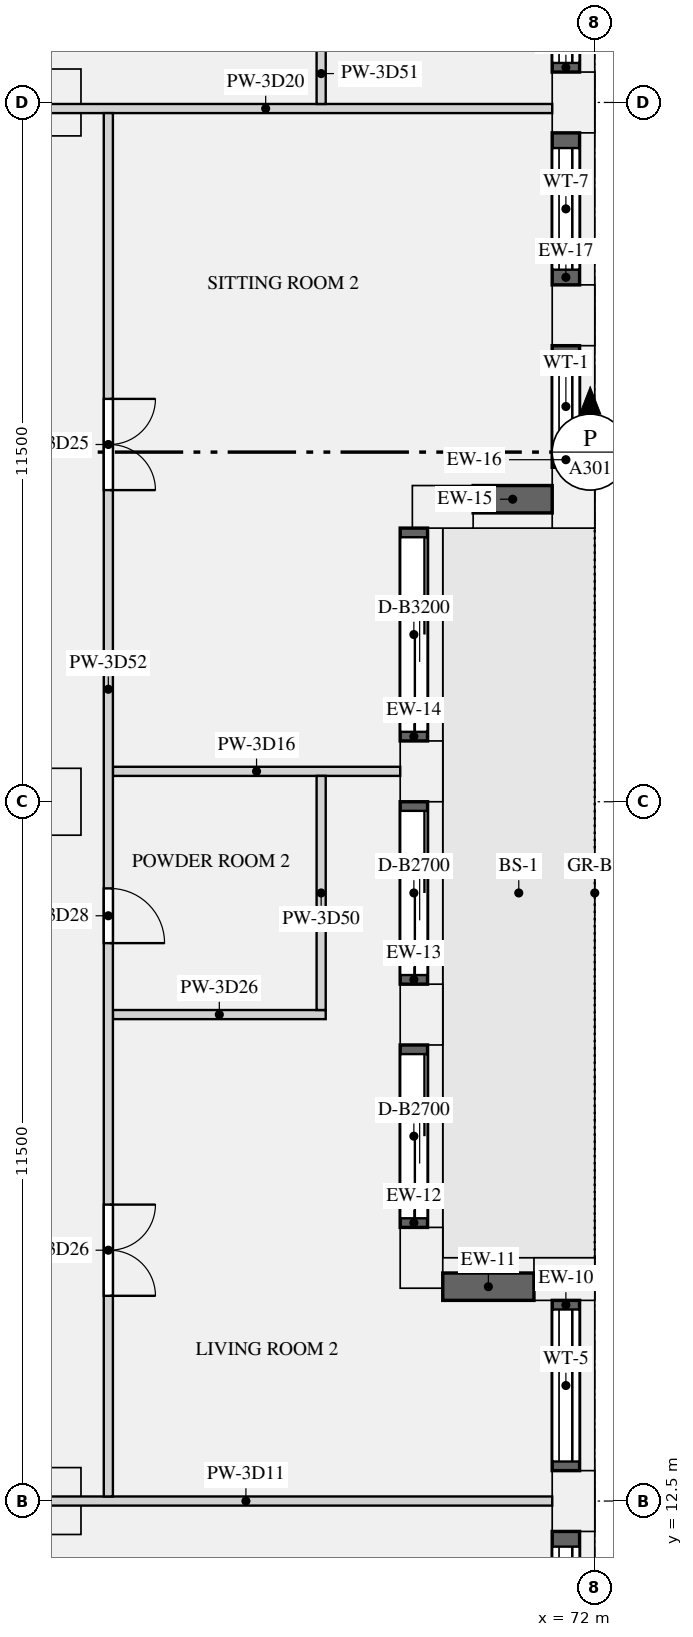
"""IFC4 building model, lengths in metres.
Left out: names, types, materials, properties, quantities, classifications, styles, units other than length and angle.
Written with IfcOpenShell. Run it as: python <this file> out.ifc"""

import sys

from ifc_helpers import new_model, si_unit, direction, frame, frame_2d, origin, origin_2d, place, context, subcontext, project, spatial, rectangle, extrude, element, fill, save


model = new_model("IFC4")
c1 = context("Model", 3, precision=1e-05, world=origin(), true_north=direction((0.0, 1.0)))
c2 = subcontext(c1, "Body", "Model", "MODEL_VIEW")
j1 = project(units=[si_unit("LENGTHUNIT", "METRE"), si_unit("PLANEANGLEUNIT", "RADIAN")], contexts=[c1])
p1 = place(None, origin())
s1 = spatial("IfcSite", under=j1, at=p1, CompositionType="ELEMENT")
p2 = place(p1, origin())
s2 = spatial("IfcBuilding", under=s1, at=p2, CompositionType="ELEMENT")
p3 = place(p2, frame((0.0, 0.0, 166.5)))
s3 = spatial("IfcBuildingStorey", under=s2, at=p3, CompositionType="ELEMENT", Elevation=166.5)
for number, where, z_axis, x_axis in (
    (1, (71.65, 12.5, 0.0), (0.0, 0.0, 1.0), (0.0, 1.0, 0.0)),
    (2, (71.5, 16.15, 0.0), (0.0, 0.0, 1.0), (-1.0, 0.0, 0.0)),
    (3, (69.15, 16.5, 0.0), (0.0, 0.0, 1.0), (0.0, 1.0, 0.0)),
    (4, (69.15, 20.5, 0.0), (0.0, 0.0, 1.0), (0.0, 1.0, 0.0)),
    (5, (69.15, 24.5, 0.0), (0.0, 0.0, 1.0), (0.0, 1.0, 0.0)),
    (6, (69.5, 28.85, 0.0), (0.0, 0.0, 1.0), (1.0, 0.0, 0.0)),
    (7, (71.65, 29.0, 0.0), (0.0, 0.0, 1.0), (0.0, 1.0, 0.0)),
    (8, (71.65, 32.0, 0.0), (0.0, 0.0, 1.0), (0.0, 1.0, 0.0)),
    (9, (71.65, 35.5, 0.0), (0.0, 0.0, 1.0), (0.0, 1.0, 0.0)),
):
    element("IfcColumn", number, at=place(p3, frame(where, z_axis=z_axis, x_axis=x_axis)), inside=s3, PredefinedType="USERDEFINED", context=c2, shape_type="SweptSolid", body=[
        extrude(rectangle(XDim=1.0, YDim=0.7, at=origin_2d()), origin(), (0.0, 0.0, 1.0), 3.15),
    ])
for number, where, z_axis, x_axis in (
    (10, (63.0, 24.0, 0.0), (0.0, 0.0, 1.0), (1.0, 0.0, 0.0)),
    (11, (63.0, 35.5, 0.0), (0.0, 0.0, 1.0), (1.0, 0.0, 0.0)),
    (12, (63.0, 12.5, 0.0), (0.0, 0.0, 1.0), (1.0, 0.0, 0.0)),
):
    element("IfcColumn", number, at=place(p3, frame(where, z_axis=z_axis, x_axis=x_axis)), inside=s3, PredefinedType="COLUMN", context=c2, shape_type="SweptSolid", body=[
        extrude(rectangle(XDim=1.1, YDim=1.1, at=origin_2d()), origin(), (0.0, 0.0, 1.0), 3.15),
    ])
p4 = place(p3, frame((71.525, 9.0, 0.9), z_axis=(0.0, 0.0, 1.0), x_axis=(0.0, 1.0, 0.0)))
e13 = element("IfcWall", 13, at=p4, inside=s3, PredefinedType="SOLIDWALL", context=c2, shape_type="SweptSolid", body=[
    extrude(rectangle(XDim=3.0, YDim=0.45, at=frame_2d((1.5, 0.0))), origin(), (0.0, 0.0, 1.0), 1.93),
])
p5 = place(p4, frame((0.25, 0.0, 0.15)))
e14 = element("IfcOpeningElement", 14, at=p5, cuts=e13, PredefinedType="OPENING", context=c2, shape_type="SweptSolid", body=[
    extrude(rectangle(XDim=2.5, YDim=1.5, at=frame_2d((1.25, 0.75))), frame((0.0, 0.235, 0.0), z_axis=(0.0, -1.0, 0.0), x_axis=(1.0, 0.0, 0.0)), (0.0, 0.0, 1.0), 0.47),
])
p6 = place(p3, frame((71.525, 13.0, 0.9), z_axis=(0.0, 0.0, 1.0), x_axis=(0.0, 1.0, 0.0)))
e15 = element("IfcWall", 15, at=p6, inside=s3, PredefinedType="SOLIDWALL", context=c2, shape_type="SweptSolid", body=[
    extrude(rectangle(XDim=2.8, YDim=0.45, at=frame_2d((1.4, 0.0))), origin(), (0.0, 0.0, 1.0), 1.93),
])
p7 = place(p6, frame((0.15, 0.0, 0.15)))
e16 = element("IfcOpeningElement", 16, at=p7, cuts=e15, PredefinedType="OPENING", context=c2, shape_type="SweptSolid", body=[
    extrude(rectangle(XDim=2.5, YDim=1.5, at=frame_2d((1.25, 0.75))), frame((0.0, 0.235, 0.0), z_axis=(0.0, -1.0, 0.0), x_axis=(1.0, 0.0, 0.0)), (0.0, 0.0, 1.0), 0.47),
])
p8 = place(p3, frame((71.0, 16.025, 0.9), z_axis=(0.0, 0.0, 1.0), x_axis=(-1.0, 0.0, 0.0)))
e17 = element("IfcWall", 17, at=p8, inside=s3, PredefinedType="SOLIDWALL", context=c2, shape_type="SweptSolid", body=[
    extrude(rectangle(XDim=1.5, YDim=0.45, at=frame_2d((0.75, 0.0))), origin(), (0.0, 0.0, 1.0), 1.93),
])
p9 = place(p3, frame((69.025, 17.0, 0.0), z_axis=(0.0, 0.0, 1.0), x_axis=(0.0, 1.0, 0.0)))
e18 = element("IfcWall", 18, at=p9, inside=s3, PredefinedType="SOLIDWALL", context=c2, shape_type="SweptSolid", body=[
    extrude(rectangle(XDim=3.0, YDim=0.45, at=frame_2d((1.5, 0.0))), origin(), (0.0, 0.0, 1.0), 2.83),
])
p10 = place(p9, frame((0.15, 0.0, 0.0)))
e19 = element("IfcOpeningElement", 19, at=p10, cuts=e18, PredefinedType="OPENING", context=c2, shape_type="SweptSolid", body=[
    extrude(rectangle(XDim=2.7, YDim=2.3, at=frame_2d((1.35, 1.15))), frame((0.0, 0.235, 0.0), z_axis=(0.0, -1.0, 0.0), x_axis=(1.0, 0.0, 0.0)), (0.0, 0.0, 1.0), 0.47),
])
p11 = place(p3, frame((69.025, 21.0, 0.0), z_axis=(0.0, 0.0, 1.0), x_axis=(0.0, 1.0, 0.0)))
e20 = element("IfcWall", 20, at=p11, inside=s3, PredefinedType="SOLIDWALL", context=c2, shape_type="SweptSolid", body=[
    extrude(rectangle(XDim=3.0, YDim=0.45, at=frame_2d((1.5, 0.0))), origin(), (0.0, 0.0, 1.0), 2.83),
])
p12 = place(p11, frame((0.15, 0.0, 0.0)))
e21 = element("IfcOpeningElement", 21, at=p12, cuts=e20, PredefinedType="OPENING", context=c2, shape_type="SweptSolid", body=[
    extrude(rectangle(XDim=2.7, YDim=2.3, at=frame_2d((1.35, 1.15))), frame((0.0, 0.235, 0.0), z_axis=(0.0, -1.0, 0.0), x_axis=(1.0, 0.0, 0.0)), (0.0, 0.0, 1.0), 0.47),
])
p13 = place(p3, frame((69.025, 25.0, 0.0), z_axis=(0.0, 0.0, 1.0), x_axis=(0.0, 1.0, 0.0)))
e22 = element("IfcWall", 22, at=p13, inside=s3, PredefinedType="SOLIDWALL", context=c2, shape_type="SweptSolid", body=[
    extrude(rectangle(XDim=3.5, YDim=0.45, at=frame_2d((1.75, 0.0))), origin(), (0.0, 0.0, 1.0), 2.83),
])
p14 = place(p13, frame((0.15, 0.0, 0.0)))
e23 = element("IfcOpeningElement", 23, at=p14, cuts=e22, PredefinedType="OPENING", context=c2, shape_type="SweptSolid", body=[
    extrude(rectangle(XDim=3.2, YDim=2.3, at=frame_2d((1.6, 1.15))), frame((0.0, 0.235, 0.0), z_axis=(0.0, -1.0, 0.0), x_axis=(1.0, 0.0, 0.0)), (0.0, 0.0, 1.0), 0.47),
])
p15 = place(p3, frame((70.0, 28.975, 0.9), z_axis=(0.0, 0.0, 1.0), x_axis=(1.0, 0.0, 0.0)))
e24 = element("IfcWall", 24, at=p15, inside=s3, PredefinedType="SOLIDWALL", context=c2, shape_type="SweptSolid", body=[
    extrude(rectangle(XDim=1.3, YDim=0.45, at=frame_2d((0.65, 0.0))), origin(), (0.0, 0.0, 1.0), 1.93),
])
p16 = place(p3, frame((71.525, 29.5, 0.9), z_axis=(0.0, 0.0, 1.0), x_axis=(0.0, 1.0, 0.0)))
e25 = element("IfcWall", 25, at=p16, inside=s3, PredefinedType="SOLIDWALL", context=c2, shape_type="SweptSolid", body=[
    extrude(rectangle(XDim=2.0, YDim=0.45, at=frame_2d((1.0, 0.0))), origin(), (0.0, 0.0, 1.0), 1.93),
])
p17 = place(p16, frame((0.25, 0.0, 0.15)))
e26 = element("IfcOpeningElement", 26, at=p17, cuts=e25, PredefinedType="OPENING", context=c2, shape_type="SweptSolid", body=[
    extrude(rectangle(XDim=1.5, YDim=1.5, at=frame_2d((0.75, 0.75))), frame((0.0, 0.235, 0.0), z_axis=(0.0, -1.0, 0.0), x_axis=(1.0, 0.0, 0.0)), (0.0, 0.0, 1.0), 0.47),
])
p18 = place(p3, frame((71.525, 32.5, 0.9), z_axis=(0.0, 0.0, 1.0), x_axis=(0.0, 1.0, 0.0)))
e27 = element("IfcWall", 27, at=p18, inside=s3, PredefinedType="SOLIDWALL", context=c2, shape_type="SweptSolid", body=[
    extrude(rectangle(XDim=2.5, YDim=0.45, at=frame_2d((1.25, 0.0))), origin(), (0.0, 0.0, 1.0), 1.93),
])
p19 = place(p18, frame((0.25, 0.0, 0.15)))
e28 = element("IfcOpeningElement", 28, at=p19, cuts=e27, PredefinedType="OPENING", context=c2, shape_type="SweptSolid", body=[
    extrude(rectangle(XDim=2.0, YDim=1.5, at=frame_2d((1.0, 0.75))), frame((0.0, 0.235, 0.0), z_axis=(0.0, -1.0, 0.0), x_axis=(1.0, 0.0, 0.0)), (0.0, 0.0, 1.0), 0.47),
])
p20 = place(p3, frame((71.525, 36.0, 0.9), z_axis=(0.0, 0.0, 1.0), x_axis=(0.0, 1.0, 0.0)))
e29 = element("IfcWall", 29, at=p20, inside=s3, PredefinedType="SOLIDWALL", context=c2, shape_type="SweptSolid", body=[
    extrude(rectangle(XDim=2.3, YDim=0.45, at=frame_2d((1.15, 0.0))), origin(), (0.0, 0.0, 1.0), 1.93),
])
p21 = place(p20, frame((0.15, 0.0, 0.15)))
e30 = element("IfcOpeningElement", 30, at=p21, cuts=e29, PredefinedType="OPENING", context=c2, shape_type="SweptSolid", body=[
    extrude(rectangle(XDim=2.0, YDim=1.5, at=frame_2d((1.0, 0.75))), frame((0.0, 0.235, 0.0), z_axis=(0.0, -1.0, 0.0), x_axis=(1.0, 0.0, 0.0)), (0.0, 0.0, 1.0), 0.47),
])
p22 = place(p3, frame((54.0, 12.5, 0.0), z_axis=(0.0, 0.0, 1.0), x_axis=(1.0, 0.0, 0.0)))
e31 = element("IfcWall", 31, at=p22, inside=s3, PredefinedType="PARTITIONING", context=c2, shape_type="SweptSolid", body=[
    extrude(rectangle(XDim=17.3, YDim=0.15, at=frame_2d((8.65, 0.0))), origin(), (0.0, 0.0, 1.0), 2.83),
])
p23 = place(p22, frame((5.725, 0.0, 0.0)))
e32 = element("IfcOpeningElement", 32, at=p23, cuts=e31, PredefinedType="OPENING", context=c2, shape_type="SweptSolid", body=[
    extrude(rectangle(XDim=1.5, YDim=2.1, at=frame_2d((0.75, 1.05))), frame((0.0, 0.085, 0.0), z_axis=(0.0, -1.0, 0.0), x_axis=(1.0, 0.0, 0.0)), (0.0, 0.0, 1.0), 0.17),
])
p24 = place(p3, frame((64.075, 24.5, 0.0), z_axis=(0.0, 0.0, 1.0), x_axis=(1.0, 0.0, 0.0)))
e33 = element("IfcWall", 33, at=p24, inside=s3, PredefinedType="PARTITIONING", context=c2, shape_type="SweptSolid", body=[
    extrude(rectangle(XDim=4.725, YDim=0.15, at=frame_2d((2.363, 0.0))), origin(), (0.0, 0.0, 1.0), 2.83),
])
p25 = place(p3, frame((59.8, 35.4, 0.0), z_axis=(0.0, 0.0, 1.0), x_axis=(1.0, 0.0, 0.0)))
e34 = element("IfcWall", 34, at=p25, inside=s3, PredefinedType="PARTITIONING", context=c2, shape_type="SweptSolid", body=[
    extrude(rectangle(XDim=11.5, YDim=0.15, at=frame_2d((5.75, 0.0))), origin(), (0.0, 0.0, 1.0), 2.83),
])
p26 = place(p25, frame((0.575, 0.0, 0.0)))
e35 = element("IfcOpeningElement", 35, at=p26, cuts=e34, PredefinedType="OPENING", context=c2, shape_type="SweptSolid", body=[
    extrude(rectangle(XDim=1.5, YDim=2.1, at=frame_2d((0.75, 1.05))), frame((0.0, 0.085, 0.0), z_axis=(0.0, -1.0, 0.0), x_axis=(1.0, 0.0, 0.0)), (0.0, 0.0, 1.0), 0.17),
])
p27 = place(p3, frame((64.075, 20.5, 0.0), z_axis=(0.0, 0.0, 1.0), x_axis=(1.0, 0.0, 0.0)))
e36 = element("IfcWall", 36, at=p27, inside=s3, PredefinedType="PARTITIONING", context=c2, shape_type="SweptSolid", body=[
    extrude(rectangle(XDim=3.5, YDim=0.15, at=frame_2d((1.75, 0.0))), origin(), (0.0, 0.0, 1.0), 2.83),
])
p28 = place(p3, frame((67.5, 20.575, 0.0), z_axis=(0.0, 0.0, 1.0), x_axis=(0.0, 1.0, 0.0)))
e37 = element("IfcWall", 37, at=p28, inside=s3, PredefinedType="PARTITIONING", context=c2, shape_type="SweptSolid", body=[
    extrude(rectangle(XDim=3.85, YDim=0.15, at=frame_2d((1.925, 0.0))), origin(), (0.0, 0.0, 1.0), 2.83),
])
p29 = place(p3, frame((67.5, 35.475, 0.0), z_axis=(0.0, 0.0, 1.0), x_axis=(0.0, 1.0, 0.0)))
e38 = element("IfcWall", 38, at=p29, inside=s3, PredefinedType="PARTITIONING", context=c2, shape_type="SweptSolid", body=[
    extrude(rectangle(XDim=2.825, YDim=0.15, at=frame_2d((1.413, 0.0))), origin(), (0.0, 0.0, 1.0), 2.83),
])
p30 = place(p29, frame((1.0, 0.0, 0.0)))
e39 = element("IfcOpeningElement", 39, at=p30, cuts=e38, PredefinedType="OPENING", context=c2, shape_type="SweptSolid", body=[
    extrude(rectangle(XDim=0.9, YDim=2.1, at=frame_2d((0.45, 1.05))), frame((0.0, 0.085, 0.0), z_axis=(0.0, -1.0, 0.0), x_axis=(1.0, 0.0, 0.0)), (0.0, 0.0, 1.0), 0.17),
])
p31 = place(p3, frame((64.0, 12.575, 0.0), z_axis=(0.0, 0.0, 1.0), x_axis=(0.0, 1.0, 0.0)))
e40 = element("IfcWall", 40, at=p31, inside=s3, PredefinedType="PARTITIONING", context=c2, shape_type="SweptSolid", body=[
    extrude(rectangle(XDim=22.75, YDim=0.15, at=frame_2d((11.375, 0.0))), origin(), (0.0, 0.0, 1.0), 2.83),
])
p32 = place(p31, frame((16.55, 0.0, 0.0)))
e41 = element("IfcOpeningElement", 41, at=p32, cuts=e40, PredefinedType="OPENING", context=c2, shape_type="SweptSolid", body=[
    extrude(rectangle(XDim=1.5, YDim=2.1, at=frame_2d((0.75, 1.05))), frame((0.0, 0.085, 0.0), z_axis=(0.0, -1.0, 0.0), x_axis=(1.0, 0.0, 0.0)), (0.0, 0.0, 1.0), 0.17),
])
p33 = place(p31, frame((3.3, 0.0, 0.0)))
e42 = element("IfcOpeningElement", 42, at=p33, cuts=e40, PredefinedType="OPENING", context=c2, shape_type="SweptSolid", body=[
    extrude(rectangle(XDim=1.5, YDim=2.1, at=frame_2d((0.75, 1.05))), frame((0.0, 0.085, 0.0), z_axis=(0.0, -1.0, 0.0), x_axis=(1.0, 0.0, 0.0)), (0.0, 0.0, 1.0), 0.17),
])
p34 = place(p31, frame((9.1, 0.0, 0.0)))
e43 = element("IfcOpeningElement", 43, at=p34, cuts=e40, PredefinedType="OPENING", context=c2, shape_type="SweptSolid", body=[
    extrude(rectangle(XDim=0.9, YDim=2.1, at=frame_2d((0.45, 1.05))), frame((0.0, 0.085, 0.0), z_axis=(0.0, -1.0, 0.0), x_axis=(1.0, 0.0, 0.0)), (0.0, 0.0, 1.0), 0.17),
])
p35 = place(p5, origin())
e44 = element("IfcWindow", 44, at=p35, inside=s3, PartitioningType="SINGLE_PANEL", PredefinedType="WINDOW", context=c2, shape_type="SweptSolid", body=[
    extrude(rectangle(XDim=2.5, YDim=1.5, at=frame_2d((1.25, 0.75))), frame((0.0, -0.065, 0.0), z_axis=(0.0, -1.0, 0.0), x_axis=(1.0, 0.0, 0.0)), (0.0, 0.0, 1.0), 0.06),
])
fill(e14, e44)
p36 = place(p7, origin())
e45 = element("IfcWindow", 45, at=p36, inside=s3, PartitioningType="SINGLE_PANEL", PredefinedType="WINDOW", context=c2, shape_type="SweptSolid", body=[
    extrude(rectangle(XDim=2.5, YDim=1.5, at=frame_2d((1.25, 0.75))), frame((0.0, -0.065, 0.0), z_axis=(0.0, -1.0, 0.0), x_axis=(1.0, 0.0, 0.0)), (0.0, 0.0, 1.0), 0.06),
])
fill(e16, e45)
p37 = place(p10, origin())
e46 = element("IfcDoor", 46, at=p37, inside=s3, OperationType="SLIDING_TO_LEFT", PredefinedType="DOOR", context=c2, shape_type="SweptSolid", body=[
    extrude(rectangle(XDim=2.7, YDim=2.3, at=frame_2d((1.35, 1.15))), frame((0.0, -0.07, 0.0), z_axis=(0.0, -1.0, 0.0), x_axis=(1.0, 0.0, 0.0)), (0.0, 0.0, 1.0), 0.05),
])
fill(e19, e46)
p38 = place(p12, origin())
e47 = element("IfcDoor", 47, at=p38, inside=s3, OperationType="SLIDING_TO_LEFT", PredefinedType="DOOR", context=c2, shape_type="SweptSolid", body=[
    extrude(rectangle(XDim=2.7, YDim=2.3, at=frame_2d((1.35, 1.15))), frame((0.0, -0.07, 0.0), z_axis=(0.0, -1.0, 0.0), x_axis=(1.0, 0.0, 0.0)), (0.0, 0.0, 1.0), 0.05),
])
fill(e21, e47)
p39 = place(p14, origin())
e48 = element("IfcDoor", 48, at=p39, inside=s3, OperationType="SLIDING_TO_LEFT", PredefinedType="DOOR", context=c2, shape_type="SweptSolid", body=[
    extrude(rectangle(XDim=3.2, YDim=2.3, at=frame_2d((1.6, 1.15))), frame((0.0, -0.07, 0.0), z_axis=(0.0, -1.0, 0.0), x_axis=(1.0, 0.0, 0.0)), (0.0, 0.0, 1.0), 0.05),
])
fill(e23, e48)
p40 = place(p17, origin())
e49 = element("IfcWindow", 49, at=p40, inside=s3, PartitioningType="SINGLE_PANEL", PredefinedType="WINDOW", context=c2, shape_type="SweptSolid", body=[
    extrude(rectangle(XDim=1.5, YDim=1.5, at=frame_2d((0.75, 0.75))), frame((0.0, -0.065, 0.0), z_axis=(0.0, -1.0, 0.0), x_axis=(1.0, 0.0, 0.0)), (0.0, 0.0, 1.0), 0.06),
])
fill(e26, e49)
p41 = place(p19, origin())
e50 = element("IfcWindow", 50, at=p41, inside=s3, PartitioningType="SINGLE_PANEL", PredefinedType="WINDOW", context=c2, shape_type="SweptSolid", body=[
    extrude(rectangle(XDim=2.0, YDim=1.5, at=frame_2d((1.0, 0.75))), frame((0.0, -0.065, 0.0), z_axis=(0.0, -1.0, 0.0), x_axis=(1.0, 0.0, 0.0)), (0.0, 0.0, 1.0), 0.06),
])
fill(e28, e50)
p42 = place(p21, origin())
e51 = element("IfcWindow", 51, at=p42, inside=s3, PartitioningType="SINGLE_PANEL", PredefinedType="WINDOW", context=c2, shape_type="SweptSolid", body=[
    extrude(rectangle(XDim=2.0, YDim=1.5, at=frame_2d((1.0, 0.75))), frame((0.0, -0.065, 0.0), z_axis=(0.0, -1.0, 0.0), x_axis=(1.0, 0.0, 0.0)), (0.0, 0.0, 1.0), 0.06),
])
fill(e30, e51)
p43 = place(p32, frame((1.5, 0.0, 0.0), z_axis=(0.0, 0.0, 1.0), x_axis=(-1.0, 0.0, 0.0)))
e52 = element("IfcDoor", 52, at=p43, inside=s3, OperationType="DOUBLE_DOOR_SINGLE_SWING", PredefinedType="DOOR", context=c2, shape_type="SweptSolid", body=[
    extrude(rectangle(XDim=1.5, YDim=2.1, at=frame_2d((0.75, 1.05))), frame((0.0, 0.025, 0.0), z_axis=(0.0, -1.0, 0.0), x_axis=(1.0, 0.0, 0.0)), (0.0, 0.0, 1.0), 0.05),
])
fill(e41, e52)
p44 = place(p33, frame((1.5, 0.0, 0.0), z_axis=(0.0, 0.0, 1.0), x_axis=(-1.0, 0.0, 0.0)))
e53 = element("IfcDoor", 53, at=p44, inside=s3, OperationType="DOUBLE_DOOR_SINGLE_SWING", PredefinedType="DOOR", context=c2, shape_type="SweptSolid", body=[
    extrude(rectangle(XDim=1.5, YDim=2.1, at=frame_2d((0.75, 1.05))), frame((0.0, 0.025, 0.0), z_axis=(0.0, -1.0, 0.0), x_axis=(1.0, 0.0, 0.0)), (0.0, 0.0, 1.0), 0.05),
])
fill(e42, e53)
p45 = place(p34, frame((0.9, 0.0, 0.0), z_axis=(0.0, 0.0, 1.0), x_axis=(-1.0, 0.0, 0.0)))
e54 = element("IfcDoor", 54, at=p45, inside=s3, OperationType="SINGLE_SWING_RIGHT", PredefinedType="DOOR", context=c2, shape_type="SweptSolid", body=[
    extrude(rectangle(XDim=0.9, YDim=2.1, at=frame_2d((0.45, 1.05))), frame((0.0, 0.025, 0.0), z_axis=(0.0, -1.0, 0.0), x_axis=(1.0, 0.0, 0.0)), (0.0, 0.0, 1.0), 0.05),
])
fill(e43, e54)
save(model, sys.argv[1])
